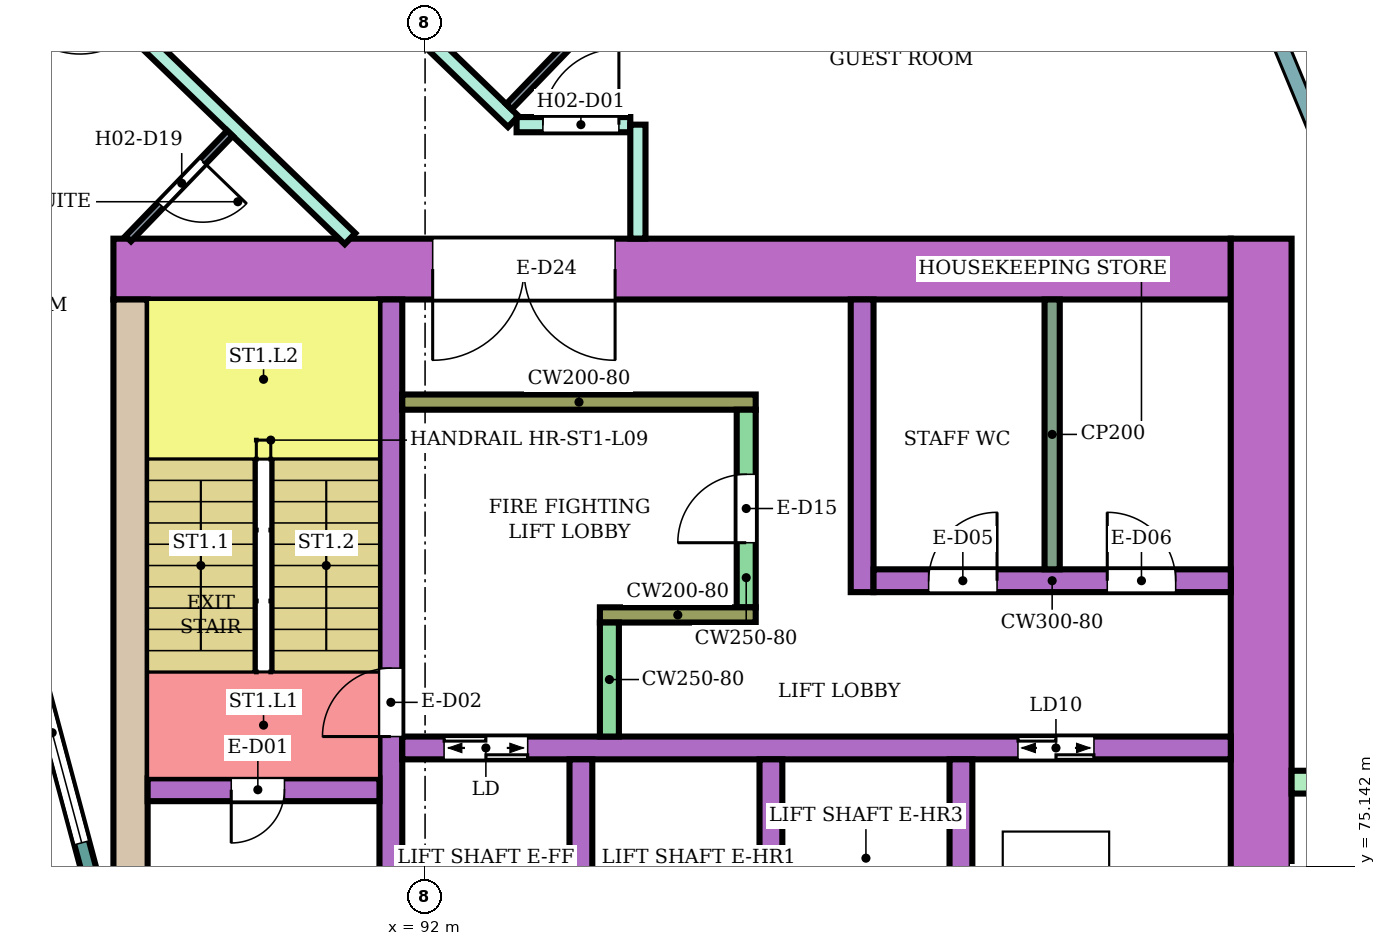
"""IFC4 building model, lengths in metres.
Left out: names, types, materials, properties, quantities, classifications, styles, units other than length and angle.
Written with IfcOpenShell. Run it as: python <this file> out.ifc"""

import sys

from ifc_helpers import new_model, si_unit, direction, frame, frame_2d, origin, place, context, subcontext, project, spatial, rectangle, extrude, element, fill, save


model = new_model("IFC4")
c1 = context("Model", 3, precision=1e-05, world=origin(), true_north=direction((0.0, 1.0)))
c2 = subcontext(c1, "Body", "Model", "MODEL_VIEW")
j1 = project(units=[si_unit("LENGTHUNIT", "METRE"), si_unit("PLANEANGLEUNIT", "RADIAN")], contexts=[c1])
p1 = place(None, origin())
s1 = spatial("IfcSite", under=j1, at=p1, CompositionType="ELEMENT")
p2 = place(p1, origin())
s2 = spatial("IfcBuilding", under=s1, at=p2, CompositionType="ELEMENT")
p3 = place(p2, frame((0.0, 0.0, 44.0)))
s3 = spatial("IfcBuildingStorey", under=s2, at=p3, CompositionType="ELEMENT", Elevation=44.0)
p4 = place(p3, frame((87.9, 83.0, 0.0), z_axis=(0.0, 0.0, 1.0), x_axis=(1.0, 0.0, 0.0)))
e1 = element("IfcWall", 1, at=p4, inside=s3, PredefinedType="SHEAR", context=c2, shape_type="SweptSolid", body=[
    extrude(rectangle(XDim=14.7, YDim=0.8, at=frame_2d((7.35, 0.0))), origin(), (0.0, 0.0, 1.0), 3.48),
])
p5 = place(p4, frame((4.2, 0.0, 0.0)))
e2 = element("IfcOpeningElement", 2, at=p5, cuts=e1, PredefinedType="OPENING", context=c2, shape_type="SweptSolid", body=[
    extrude(rectangle(XDim=2.4, YDim=2.4, at=frame_2d((1.2, 1.2))), frame((0.0, 0.41, 0.0), z_axis=(0.0, -1.0, 0.0), x_axis=(1.0, 0.0, 0.0)), (0.0, 0.0, 1.0), 0.82),
])
p6 = place(p3, frame((88.125, 75.0, 0.0), z_axis=(0.0, 0.0, 1.0), x_axis=(0.0, 1.0, 0.0)))
e3 = element("IfcWall", 3, at=p6, inside=s3, PredefinedType="SHEAR", context=c2, shape_type="SweptSolid", body=[
    extrude(rectangle(XDim=7.6, YDim=0.45, at=frame_2d((3.8, 0.0))), origin(), (0.0, 0.0, 1.0), 3.48),
])
p7 = place(p3, frame((103.0, 66.6, 0.0), z_axis=(0.0, 0.0, 1.0), x_axis=(0.0, 1.0, 0.0)))
e4 = element("IfcWall", 4, at=p7, inside=s3, PredefinedType="SHEAR", context=c2, shape_type="SweptSolid", body=[
    extrude(rectangle(XDim=16.8, YDim=0.8, at=frame_2d((8.4, 0.0))), origin(), (0.0, 0.0, 1.0), 3.48),
])
p8 = place(p3, frame((91.55, 75.0, 0.0), z_axis=(0.0, 0.0, 1.0), x_axis=(0.0, 1.0, 0.0)))
e5 = element("IfcWall", 5, at=p8, inside=s3, PredefinedType="SHEAR", context=c2, shape_type="SweptSolid", body=[
    extrude(rectangle(XDim=7.6, YDim=0.3, at=frame_2d((3.8, 0.0))), origin(), (0.0, 0.0, 1.0), 3.48),
])
p9 = place(p8, frame((1.85, 0.0, 0.0)))
e6 = element("IfcOpeningElement", 6, at=p9, cuts=e5, PredefinedType="OPENING", context=c2, shape_type="SweptSolid", body=[
    extrude(rectangle(XDim=0.9, YDim=2.1, at=frame_2d((0.45, 1.05))), frame((0.0, 0.16, 0.0), z_axis=(0.0, -1.0, 0.0), x_axis=(1.0, 0.0, 0.0)), (0.0, 0.0, 1.0), 0.32),
])
p10 = place(p3, frame((88.35, 76.15, 0.0), z_axis=(0.0, 0.0, 1.0), x_axis=(1.0, 0.0, 0.0)))
e7 = element("IfcWall", 7, at=p10, inside=s3, PredefinedType="SHEAR", context=c2, shape_type="SweptSolid", body=[
    extrude(rectangle(XDim=3.05, YDim=0.3, at=frame_2d((1.525, 0.0))), origin(), (0.0, 0.0, 1.0), 3.48),
])
p11 = place(p10, frame((1.1, 0.0, 0.0)))
e8 = element("IfcOpeningElement", 8, at=p11, cuts=e7, PredefinedType="OPENING", context=c2, shape_type="SweptSolid", body=[
    extrude(rectangle(XDim=0.7, YDim=2.0, at=frame_2d((0.35, 1.0))), frame((0.0, 0.16, 0.0), z_axis=(0.0, -1.0, 0.0), x_axis=(1.0, 0.0, 0.0)), (0.0, 0.0, 1.0), 0.32),
])
p12 = place(p3, frame((91.7, 76.7, 0.0), z_axis=(0.0, 0.0, 1.0), x_axis=(1.0, 0.0, 0.0)))
e9 = element("IfcWall", 9, at=p12, inside=s3, PredefinedType="SHEAR", context=c2, shape_type="SweptSolid", body=[
    extrude(rectangle(XDim=10.9, YDim=0.3, at=frame_2d((5.45, 0.0))), origin(), (0.0, 0.0, 1.0), 3.48),
])
p13 = place(p12, frame((0.55, 0.0, 0.0)))
e10 = element("IfcOpeningElement", 10, at=p13, cuts=e9, PredefinedType="OPENING", context=c2, shape_type="SweptSolid", body=[
    extrude(rectangle(XDim=1.1, YDim=2.1, at=frame_2d((0.55, 1.05))), frame((0.0, 0.16, 0.0), z_axis=(0.0, -1.0, 0.0), x_axis=(1.0, 0.0, 0.0)), (0.0, 0.0, 1.0), 0.32),
])
p14 = place(p12, frame((8.1, 0.0, 0.0)))
e11 = element("IfcOpeningElement", 11, at=p14, cuts=e9, PredefinedType="OPENING", context=c2, shape_type="SweptSolid", body=[
    extrude(rectangle(XDim=1.0, YDim=2.1, at=frame_2d((0.5, 1.05))), frame((0.0, 0.16, 0.0), z_axis=(0.0, -1.0, 0.0), x_axis=(1.0, 0.0, 0.0)), (0.0, 0.0, 1.0), 0.32),
])
for number, where, z_axis, x_axis in (
    (12, (94.05, 74.0, 0.0), (0.0, 0.0, 1.0), (0.0, 1.0, 0.0)),
    (13, (96.55, 74.0, 0.0), (0.0, 0.0, 1.0), (0.0, 1.0, 0.0)),
    (14, (99.05, 74.0, 0.0), (0.0, 0.0, 1.0), (0.0, 1.0, 0.0)),
):
    element("IfcWall", number, at=place(p3, frame(where, z_axis=z_axis, x_axis=x_axis)), inside=s3, PredefinedType="SHEAR", context=c2, shape_type="SweptSolid", body=[
        extrude(rectangle(XDim=2.55, YDim=0.3, at=frame_2d((1.275, 0.0))), origin(), (0.0, 0.0, 1.0), 3.48),
    ])
p15 = place(p3, frame((91.7, 81.25, 0.0), z_axis=(0.0, 0.0, 1.0), x_axis=(1.0, 0.0, 0.0)))
e15 = element("IfcWall", 15, at=p15, inside=s3, PredefinedType="SHEAR", context=c2, shape_type="SweptSolid", body=[
    extrude(rectangle(XDim=4.65, YDim=0.2, at=frame_2d((2.325, 0.0))), origin(), (0.0, 0.0, 1.0), 3.48),
])
p16 = place(p3, frame((96.225, 78.55, 0.0), z_axis=(0.0, 0.0, 1.0), x_axis=(0.0, 1.0, 0.0)))
e16 = element("IfcWall", 16, at=p16, inside=s3, PredefinedType="SHEAR", context=c2, shape_type="SweptSolid", body=[
    extrude(rectangle(XDim=2.6, YDim=0.25, at=frame_2d((1.3, 0.0))), origin(), (0.0, 0.0, 1.0), 3.48),
])
p17 = place(p16, frame((0.85, 0.0, 0.0)))
e17 = element("IfcOpeningElement", 17, at=p17, cuts=e16, PredefinedType="OPENING", context=c2, shape_type="SweptSolid", body=[
    extrude(rectangle(XDim=0.9, YDim=2.1, at=frame_2d((0.45, 1.05))), frame((0.0, 0.135, 0.0), z_axis=(0.0, -1.0, 0.0), x_axis=(1.0, 0.0, 0.0)), (0.0, 0.0, 1.0), 0.27),
])
p18 = place(p3, frame((94.3, 78.45, 0.0), z_axis=(0.0, 0.0, 1.0), x_axis=(1.0, 0.0, 0.0)))
e18 = element("IfcWall", 18, at=p18, inside=s3, PredefinedType="SHEAR", context=c2, shape_type="SweptSolid", body=[
    extrude(rectangle(XDim=2.05, YDim=0.2, at=frame_2d((1.025, 0.0))), origin(), (0.0, 0.0, 1.0), 3.48),
])
p19 = place(p3, frame((94.425, 76.85, 0.0), z_axis=(0.0, 0.0, 1.0), x_axis=(0.0, 1.0, 0.0)))
e19 = element("IfcWall", 19, at=p19, inside=s3, PredefinedType="SHEAR", context=c2, shape_type="SweptSolid", body=[
    extrude(rectangle(XDim=1.5, YDim=0.25, at=frame_2d((0.75, 0.0))), origin(), (0.0, 0.0, 1.0), 3.48),
])
p20 = place(p3, frame((97.75, 78.75, 0.0), z_axis=(0.0, 0.0, 1.0), x_axis=(0.0, 1.0, 0.0)))
e20 = element("IfcWall", 20, at=p20, inside=s3, PredefinedType="SHEAR", context=c2, shape_type="SweptSolid", body=[
    extrude(rectangle(XDim=3.85, YDim=0.3, at=frame_2d((1.925, 0.0))), origin(), (0.0, 0.0, 1.0), 3.48),
])
p21 = place(p3, frame((97.9, 78.9, 0.0), z_axis=(0.0, 0.0, 1.0), x_axis=(1.0, 0.0, 0.0)))
e21 = element("IfcWall", 21, at=p21, inside=s3, PredefinedType="SHEAR", context=c2, shape_type="SweptSolid", body=[
    extrude(rectangle(XDim=4.7, YDim=0.3, at=frame_2d((2.35, 0.0))), origin(), (0.0, 0.0, 1.0), 3.48),
])
p22 = place(p21, frame((0.725, 0.0, 0.0)))
e22 = element("IfcOpeningElement", 22, at=p22, cuts=e21, PredefinedType="OPENING", context=c2, shape_type="SweptSolid", body=[
    extrude(rectangle(XDim=0.9, YDim=2.1, at=frame_2d((0.45, 1.05))), frame((0.0, 0.16, 0.0), z_axis=(0.0, -1.0, 0.0), x_axis=(1.0, 0.0, 0.0)), (0.0, 0.0, 1.0), 0.32),
])
p23 = place(p21, frame((3.075, 0.0, 0.0)))
e23 = element("IfcOpeningElement", 23, at=p23, cuts=e21, PredefinedType="OPENING", context=c2, shape_type="SweptSolid", body=[
    extrude(rectangle(XDim=0.9, YDim=2.1, at=frame_2d((0.45, 1.05))), frame((0.0, 0.16, 0.0), z_axis=(0.0, -1.0, 0.0), x_axis=(1.0, 0.0, 0.0)), (0.0, 0.0, 1.0), 0.32),
])
p24 = place(p3, frame((103.4, 76.25, 0.0), z_axis=(0.0, 0.0, 1.0), x_axis=(1.0, 0.0, 0.0)))
e24 = element("IfcWall", 24, at=p24, inside=s3, PredefinedType="NOTDEFINED", context=c2, shape_type="SweptSolid", body=[
    extrude(rectangle(XDim=2.416, YDim=0.3, at=frame_2d((1.208, 0.0))), origin(), (0.0, 0.0, 1.0), 3.8),
])
p25 = place(p3, frame((87.604, 75.0, 0.0), z_axis=(0.0, 0.0, 1.0), x_axis=(-0.258789828301, 0.965933654434, 0.0)))
e25 = element("IfcWall", 25, at=p25, inside=s3, PredefinedType="NOTDEFINED", context=c2, shape_type="SweptSolid", body=[
    extrude(rectangle(XDim=3.936, YDim=0.2, at=frame_2d((1.968, 0.0))), origin(), (0.0, 0.0, 1.0), 3.8),
])
p26 = place(p25, frame((0.468, 0.0, 0.9)))
e26 = element("IfcOpeningElement", 26, at=p26, cuts=e25, PredefinedType="OPENING", context=c2, shape_type="SweptSolid", body=[
    extrude(rectangle(XDim=3.0, YDim=2.3, at=frame_2d((1.5, 1.15))), frame((0.0, 0.11, 0.0), z_axis=(0.0, -1.0, 0.0), x_axis=(1.0, 0.0, 0.0)), (0.0, 0.0, 1.0), 0.22),
])
p27 = place(p3, frame((87.064, 87.211, 0.0), z_axis=(0.0, 0.0, 1.0), x_axis=(0.719540958932, -0.694450004262, 0.0)))
e27 = element("IfcWall", 27, at=p27, inside=s3, PredefinedType="PARTITIONING", context=c2, shape_type="SweptSolid", body=[
    extrude(rectangle(XDim=5.488, YDim=0.2, at=frame_2d((2.744, 0.0))), origin(), (0.0, 0.0, 1.0), 3.35),
])
p28 = place(p27, frame((0.55, 0.0, 0.0)))
e28 = element("IfcOpeningElement", 28, at=p28, cuts=e27, PredefinedType="OPENING", context=c2, shape_type="SweptSolid", body=[
    extrude(rectangle(XDim=1.0, YDim=2.1, at=frame_2d((0.5, 1.05))), frame((0.0, 0.11, 0.0), z_axis=(0.0, -1.0, 0.0), x_axis=(1.0, 0.0, 0.0)), (0.0, 0.0, 1.0), 0.22),
])
p29 = place(p3, frame((88.465, 89.473, 0.0), z_axis=(0.0, 0.0, 1.0), x_axis=(0.719474304909, -0.694519059908, 0.0)))
e29 = element("IfcWall", 29, at=p29, inside=s3, PredefinedType="PARTITIONING", context=c2, shape_type="SweptSolid", body=[
    extrude(rectangle(XDim=6.525, YDim=0.2, at=frame_2d((3.263, 0.0))), origin(), (0.0, 0.0, 1.0), 3.35),
])
p30 = place(p29, frame((2.719, 0.0, 0.0)))
e30 = element("IfcOpeningElement", 30, at=p30, cuts=e29, PredefinedType="OPENING", context=c2, shape_type="SweptSolid", body=[
    extrude(rectangle(XDim=1.0, YDim=2.1, at=frame_2d((0.5, 1.05))), frame((0.0, 0.11, 0.0), z_axis=(0.0, -1.0, 0.0), x_axis=(1.0, 0.0, 0.0)), (0.0, 0.0, 1.0), 0.22),
])
p31 = place(p3, frame((93.204, 84.9, 0.0), z_axis=(0.0, 0.0, 1.0), x_axis=(1.0, 0.0, 0.0)))
e31 = element("IfcWall", 31, at=p31, inside=s3, PredefinedType="PARTITIONING", context=c2, shape_type="SweptSolid", body=[
    extrude(rectangle(XDim=1.496, YDim=0.2, at=frame_2d((0.748, 0.0))), origin(), (0.0, 0.0, 1.0), 3.35),
])
p32 = place(p31, frame((0.346, 0.0, 0.0)))
e32 = element("IfcOpeningElement", 32, at=p32, cuts=e31, PredefinedType="OPENING", context=c2, shape_type="SweptSolid", body=[
    extrude(rectangle(XDim=1.0, YDim=2.1, at=frame_2d((0.5, 1.05))), frame((0.0, 0.11, 0.0), z_axis=(0.0, -1.0, 0.0), x_axis=(1.0, 0.0, 0.0)), (0.0, 0.0, 1.0), 0.22),
])
p33 = place(p3, frame((94.8, 83.401, 0.0), z_axis=(0.0, 0.0, 1.0), x_axis=(0.0, 1.0, 0.0)))
e33 = element("IfcWall", 33, at=p33, inside=s3, PredefinedType="PARTITIONING", context=c2, shape_type="SweptSolid", body=[
    extrude(rectangle(XDim=1.499, YDim=0.2, at=frame_2d((0.75, 0.0))), origin(), (0.0, 0.0, 1.0), 3.35),
])
p34 = place(p3, frame((88.095, 83.4, 0.0), z_axis=(0.0, 0.0, 1.0), x_axis=(0.694447472534, 0.719543402368, 0.0)))
e34 = element("IfcWall", 34, at=p34, inside=s3, PredefinedType="PARTITIONING", context=c2, shape_type="SweptSolid", body=[
    extrude(rectangle(XDim=1.926, YDim=0.1, at=frame_2d((0.963, 0.0))), origin(), (0.0, 0.0, 1.0), 3.35),
])
p35 = place(p34, frame((0.613, 0.0, 0.0)))
e35 = element("IfcOpeningElement", 35, at=p35, cuts=e34, PredefinedType="OPENING", context=c2, shape_type="SweptSolid", body=[
    extrude(rectangle(XDim=0.8, YDim=2.1, at=frame_2d((0.4, 1.05))), frame((0.0, 0.06, 0.0), z_axis=(0.0, -1.0, 0.0), x_axis=(1.0, 0.0, 0.0)), (0.0, 0.0, 1.0), 0.12),
])
p36 = place(p3, frame((93.104, 85.136, 0.0), z_axis=(0.0, 0.0, 1.0), x_axis=(0.694324808789, 0.719661767708, 0.0)))
e36 = element("IfcWall", 36, at=p36, inside=s3, PredefinedType="PARTITIONING", context=c2, shape_type="SweptSolid", body=[
    extrude(rectangle(XDim=2.65, YDim=0.1, at=frame_2d((1.325, 0.0))), origin(), (0.0, 0.0, 1.0), 3.35),
])
p37 = place(p36, frame((1.05, 0.0, 0.0)))
e37 = element("IfcOpeningElement", 37, at=p37, cuts=e36, PredefinedType="OPENING", context=c2, shape_type="SweptSolid", body=[
    extrude(rectangle(XDim=0.8, YDim=2.1, at=frame_2d((0.4, 1.05))), frame((0.0, 0.06, 0.0), z_axis=(0.0, -1.0, 0.0), x_axis=(1.0, 0.0, 0.0)), (0.0, 0.0, 1.0), 0.12),
])
p38 = place(p3, frame((100.25, 79.05, 0.0), z_axis=(0.0, 0.0, 1.0), x_axis=(0.0, 1.0, 0.0)))
e38 = element("IfcWall", 38, at=p38, inside=s3, PredefinedType="PARTITIONING", context=c2, shape_type="SweptSolid", body=[
    extrude(rectangle(XDim=3.55, YDim=0.2, at=frame_2d((1.775, 0.0))), origin(), (0.0, 0.0, 1.0), 3.48),
])
p39 = place(p26, origin())
e39 = element("IfcWindow", 39, at=p39, inside=s3, PartitioningType="SINGLE_PANEL", PredefinedType="WINDOW", context=c2, shape_type="SweptSolid", body=[
    extrude(rectangle(XDim=3.0, YDim=2.3, at=frame_2d((1.5, 1.15))), frame((0.0, 0.03, 0.0), z_axis=(0.0, -1.0, 0.0), x_axis=(1.0, 0.0, 0.0)), (0.0, 0.0, 1.0), 0.06),
])
fill(e26, e39)
p40 = place(p32, origin())
e40 = element("IfcDoor", 40, at=p40, inside=s3, OperationType="SINGLE_SWING_RIGHT", PredefinedType="DOOR", context=c2, shape_type="SweptSolid", body=[
    extrude(rectangle(XDim=1.0, YDim=2.1, at=frame_2d((0.5, 1.05))), frame((0.0, 0.025, 0.0), z_axis=(0.0, -1.0, 0.0), x_axis=(1.0, 0.0, 0.0)), (0.0, 0.0, 1.0), 0.05),
])
fill(e32, e40)
p41 = place(p35, frame((0.8, 0.0, 0.0), z_axis=(0.0, 0.0, 1.0), x_axis=(-1.0, 0.0, 0.0)))
e41 = element("IfcDoor", 41, at=p41, inside=s3, OperationType="SINGLE_SWING_LEFT", PredefinedType="DOOR", context=c2, shape_type="SweptSolid", body=[
    extrude(rectangle(XDim=0.8, YDim=2.1, at=frame_2d((0.4, 1.05))), frame((0.0, 0.025, 0.0), z_axis=(0.0, -1.0, 0.0), x_axis=(1.0, 0.0, 0.0)), (0.0, 0.0, 1.0), 0.05),
])
fill(e35, e41)
p42 = place(p11, frame((0.7, 0.0, 0.0), z_axis=(0.0, 0.0, 1.0), x_axis=(-1.0, 0.0, 0.0)))
e42 = element("IfcDoor", 42, at=p42, inside=s3, OperationType="SINGLE_SWING_RIGHT", PredefinedType="DOOR", context=c2, shape_type="SweptSolid", body=[
    extrude(rectangle(XDim=0.7, YDim=2.0, at=frame_2d((0.35, 1.0))), frame((0.0, 0.025, 0.0), z_axis=(0.0, -1.0, 0.0), x_axis=(1.0, 0.0, 0.0)), (0.0, 0.0, 1.0), 0.05),
])
fill(e8, e42)
p43 = place(p9, origin())
e43 = element("IfcDoor", 43, at=p43, inside=s3, OperationType="SINGLE_SWING_LEFT", PredefinedType="DOOR", context=c2, shape_type="SweptSolid", body=[
    extrude(rectangle(XDim=0.9, YDim=2.1, at=frame_2d((0.45, 1.05))), frame((0.0, 0.025, 0.0), z_axis=(0.0, -1.0, 0.0), x_axis=(1.0, 0.0, 0.0)), (0.0, 0.0, 1.0), 0.05),
])
fill(e6, e43)
p44 = place(p13, origin())
e44 = element("IfcDoor", 44, at=p44, inside=s3, OperationType="DOUBLE_DOOR_SLIDING", PredefinedType="DOOR", context=c2, shape_type="SweptSolid", body=[
    extrude(rectangle(XDim=1.1, YDim=2.1, at=frame_2d((0.55, 1.05))), frame((0.0, 0.025, 0.0), z_axis=(0.0, -1.0, 0.0), x_axis=(1.0, 0.0, 0.0)), (0.0, 0.0, 1.0), 0.05),
])
fill(e10, e44)
p45 = place(p14, origin())
e45 = element("IfcDoor", 45, at=p45, inside=s3, OperationType="DOUBLE_DOOR_SLIDING", PredefinedType="DOOR", context=c2, shape_type="SweptSolid", body=[
    extrude(rectangle(XDim=1.0, YDim=2.1, at=frame_2d((0.5, 1.05))), frame((0.0, 0.025, 0.0), z_axis=(0.0, -1.0, 0.0), x_axis=(1.0, 0.0, 0.0)), (0.0, 0.0, 1.0), 0.05),
])
fill(e11, e45)
p46 = place(p17, origin())
e46 = element("IfcDoor", 46, at=p46, inside=s3, OperationType="SINGLE_SWING_LEFT", PredefinedType="DOOR", context=c2, shape_type="SweptSolid", body=[
    extrude(rectangle(XDim=0.9, YDim=2.1, at=frame_2d((0.45, 1.05))), frame((0.0, 0.025, 0.0), z_axis=(0.0, -1.0, 0.0), x_axis=(1.0, 0.0, 0.0)), (0.0, 0.0, 1.0), 0.05),
])
fill(e17, e46)
p47 = place(p22, origin())
e47 = element("IfcDoor", 47, at=p47, inside=s3, OperationType="SINGLE_SWING_RIGHT", PredefinedType="DOOR", context=c2, shape_type="SweptSolid", body=[
    extrude(rectangle(XDim=0.9, YDim=2.1, at=frame_2d((0.45, 1.05))), frame((0.0, 0.025, 0.0), z_axis=(0.0, -1.0, 0.0), x_axis=(1.0, 0.0, 0.0)), (0.0, 0.0, 1.0), 0.05),
])
fill(e22, e47)
p48 = place(p23, origin())
e48 = element("IfcDoor", 48, at=p48, inside=s3, OperationType="SINGLE_SWING_LEFT", PredefinedType="DOOR", context=c2, shape_type="SweptSolid", body=[
    extrude(rectangle(XDim=0.9, YDim=2.1, at=frame_2d((0.45, 1.05))), frame((0.0, 0.025, 0.0), z_axis=(0.0, -1.0, 0.0), x_axis=(1.0, 0.0, 0.0)), (0.0, 0.0, 1.0), 0.05),
])
fill(e23, e48)
p49 = place(p5, frame((2.4, 0.0, 0.0), z_axis=(0.0, 0.0, 1.0), x_axis=(-1.0, 0.0, 0.0)))
e49 = element("IfcDoor", 49, at=p49, inside=s3, OperationType="DOUBLE_DOOR_SINGLE_SWING", PredefinedType="DOOR", context=c2, shape_type="SweptSolid", body=[
    extrude(rectangle(XDim=2.4, YDim=2.4, at=frame_2d((1.2, 1.2))), frame((0.0, 0.025, 0.0), z_axis=(0.0, -1.0, 0.0), x_axis=(1.0, 0.0, 0.0)), (0.0, 0.0, 1.0), 0.05),
])
fill(e2, e49)
save(model, sys.argv[1])
